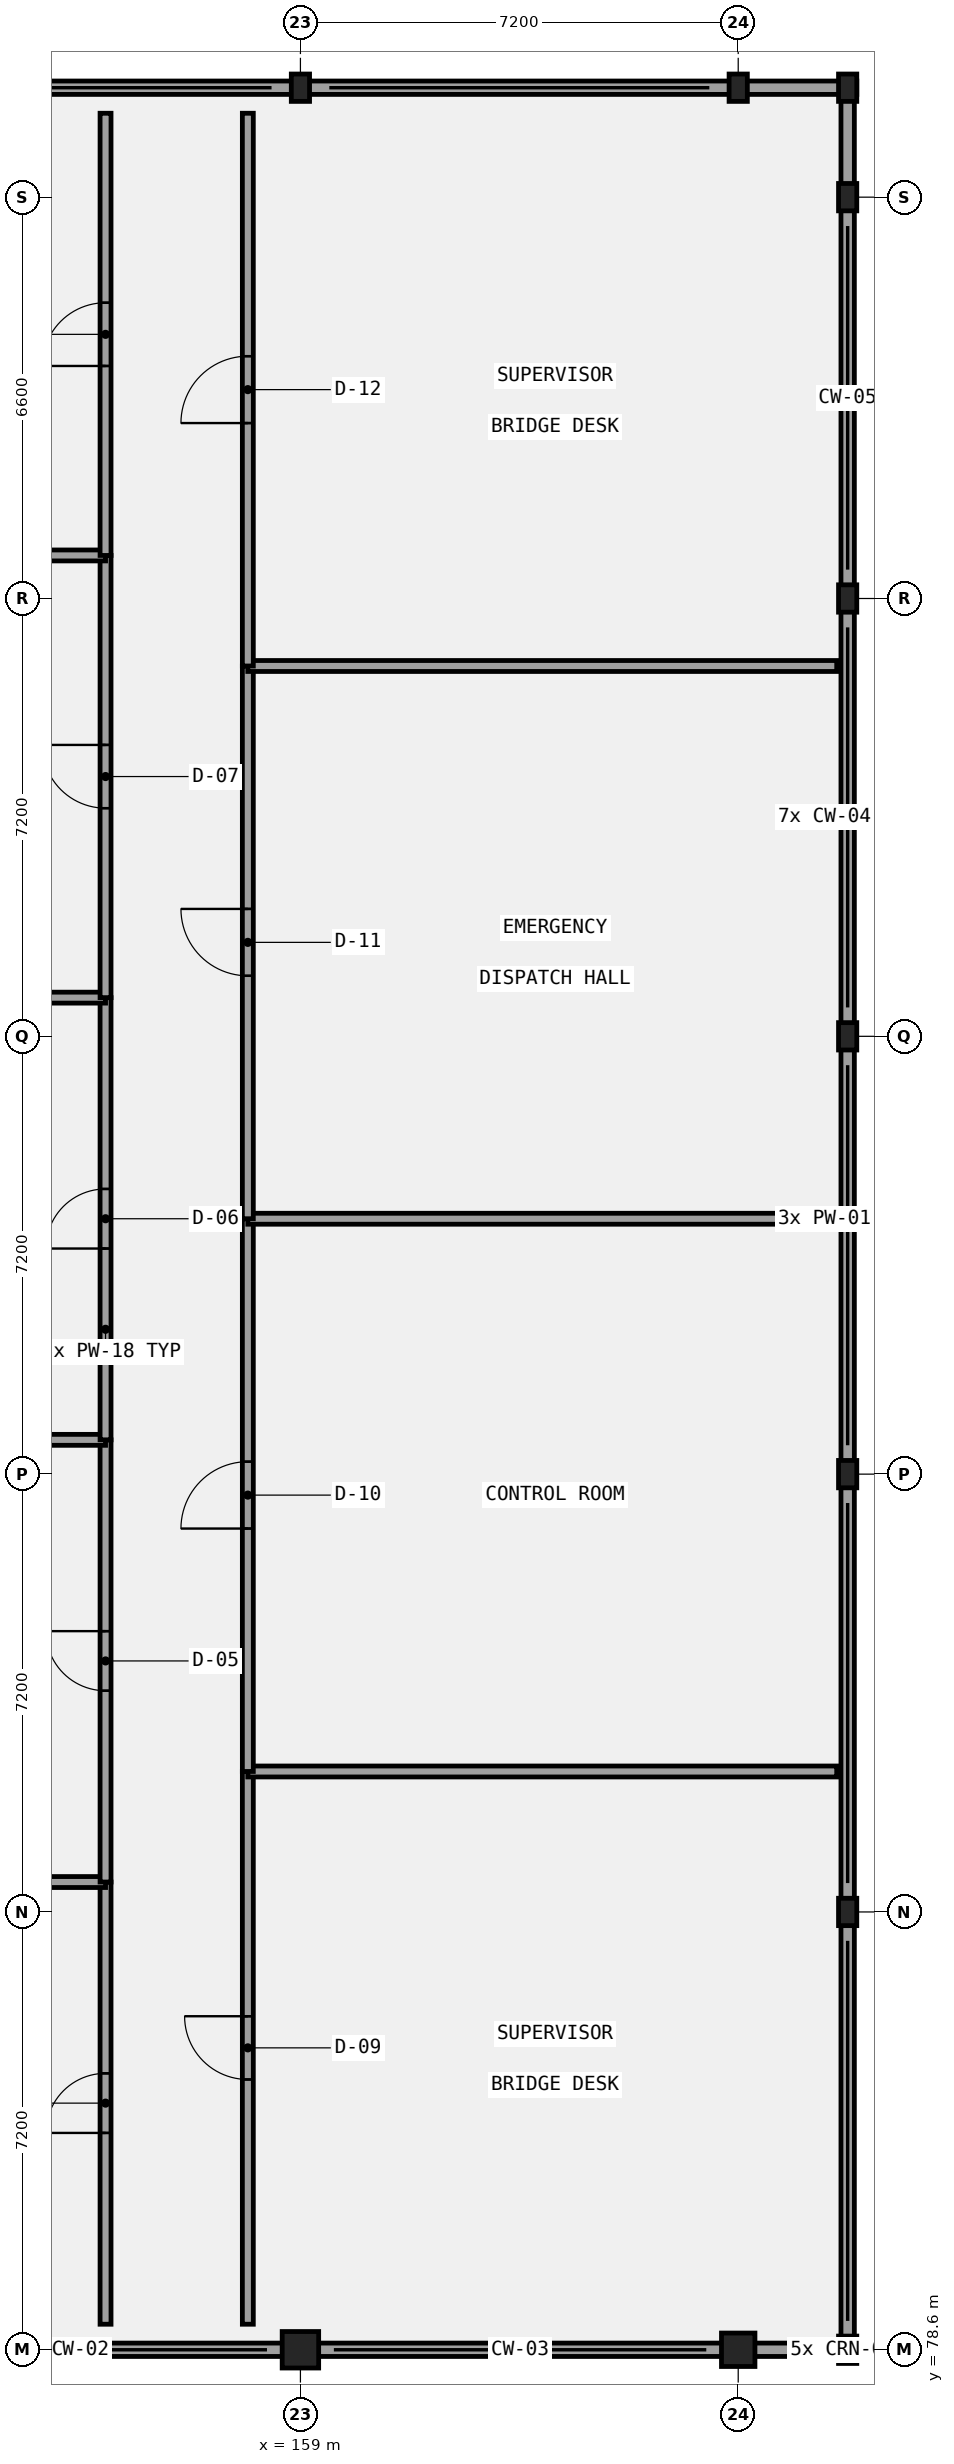
"""IFC4 building model, lengths in metres.
Left out: names, types, materials, properties, quantities, classifications, styles, units other than length and angle.
Written with IfcOpenShell. Run it as: python <this file> out.ifc"""

import sys

from ifc_helpers import new_model, si_unit, direction, frame, frame_2d, origin, origin_2d, place, context, subcontext, project, spatial, rectangle, i_section, extrude, element, fill, save


model = new_model("IFC4")
c1 = context("Model", 3, precision=1e-05, world=origin(), true_north=direction((0.0, 1.0)))
c2 = subcontext(c1, "Body", "Model", "MODEL_VIEW")
j1 = project(units=[si_unit("LENGTHUNIT", "METRE"), si_unit("PLANEANGLEUNIT", "RADIAN")], contexts=[c1])
p1 = place(None, origin())
s1 = spatial("IfcSite", under=j1, at=p1, CompositionType="ELEMENT")
p2 = place(p1, origin())
s2 = spatial("IfcBuilding", under=s1, at=p2, CompositionType="ELEMENT")
p3 = place(p2, frame((0.0, 0.0, 26.4)))
s3 = spatial("IfcBuildingStorey", under=s2, at=p3, CompositionType="ELEMENT", Elevation=26.4)
p4 = place(p3, frame((159.0, 78.6, 0.0), z_axis=(0.0, 0.0, 1.0), x_axis=(1.0, 0.0, 0.0)))
e1 = element("IfcColumn", 1, at=p4, inside=s3, PredefinedType="COLUMN", context=c2, shape_type="SweptSolid", body=[
    extrude(rectangle(XDim=0.6, YDim=0.6, at=origin_2d()), origin(), (0.0, 0.0, 1.0), 4.5),
])
p5 = place(p3, frame((166.2, 78.6, 0.0), z_axis=(0.0, 0.0, 1.0), x_axis=(1.0, 0.0, 0.0)))
e2 = element("IfcColumn", 2, at=p5, inside=s3, PredefinedType="COLUMN", context=c2, shape_type="SweptSolid", body=[
    extrude(rectangle(XDim=0.55, YDim=0.55, at=origin_2d()), origin(), (0.0, 0.0, 1.0), 4.5),
])
for number, where, z_axis, x_axis in (
    (3, (168.0, 78.6, 0.0), (0.0, 0.0, 1.0), (1.0, 0.0, 0.0)),
    (4, (168.0, 85.8, 0.0), (0.0, 0.0, 1.0), (1.0, 0.0, 0.0)),
    (5, (168.0, 93.0, 0.0), (0.0, 0.0, 1.0), (1.0, 0.0, 0.0)),
    (6, (168.0, 100.2, 0.0), (0.0, 0.0, 1.0), (1.0, 0.0, 0.0)),
    (7, (168.0, 107.4, 0.0), (0.0, 0.0, 1.0), (1.0, 0.0, 0.0)),
    (8, (168.0, 114.0, 0.0), (0.0, 0.0, 1.0), (1.0, 0.0, 0.0)),
    (9, (168.0, 115.8, 0.0), (0.0, 0.0, 1.0), (1.0, 0.0, 0.0)),
    (10, (166.2, 115.8, 0.0), (0.0, 0.0, 1.0), (1.0, 0.0, 0.0)),
    (11, (159.0, 115.8, 0.0), (0.0, 0.0, 1.0), (1.0, 0.0, 0.0)),
):
    element("IfcColumn", number, at=place(p3, frame(where, z_axis=z_axis, x_axis=x_axis)), inside=s3, PredefinedType="COLUMN", context=c2, shape_type="SweptSolid", body=[
        extrude(i_section(OverallWidth=0.3, OverallDepth=0.45, WebThickness=0.014, FlangeThickness=0.026, FilletRadius=0.027, at=origin_2d()), origin(), (0.0, 0.0, 1.0), 4.5),
    ])
p6 = place(p3, frame((144.45, 78.6, 0.0), z_axis=(0.0, 0.0, 1.0), x_axis=(1.0, 0.0, 0.0)))
e12 = element("IfcWall", 12, at=p6, inside=s3, PredefinedType="PARAPET", context=c2, shape_type="SweptSolid", body=[
    extrude(rectangle(XDim=23.7, YDim=0.22, at=frame_2d((11.85, 0.0))), origin(), (0.0, 0.0, 1.0), 0.45),
])
p7 = place(p3, frame((168.0, 78.75, 0.0), z_axis=(0.0, 0.0, 1.0), x_axis=(0.0, 1.0, 0.0)))
e13 = element("IfcWall", 13, at=p7, inside=s3, PredefinedType="PARAPET", context=c2, shape_type="SweptSolid", body=[
    extrude(rectangle(XDim=36.9, YDim=0.22, at=frame_2d((18.45, 0.0))), origin(), (0.0, 0.0, 1.0), 0.45),
])
p8 = place(p3, frame((168.15, 115.8, 0.0), z_axis=(0.0, 0.0, 1.0), x_axis=(-1.0, 0.0, 0.0)))
e14 = element("IfcWall", 14, at=p8, inside=s3, PredefinedType="PARAPET", context=c2, shape_type="SweptSolid", body=[
    extrude(rectangle(XDim=23.7, YDim=0.22, at=frame_2d((11.85, 0.0))), origin(), (0.0, 0.0, 1.0), 0.45),
])
p9 = place(p3, frame((155.795, 79.02, 0.0), z_axis=(0.0, 0.0, 1.0), x_axis=(0.0, 1.0, 0.0)))
e15 = element("IfcWall", 15, at=p9, inside=s3, PredefinedType="PARTITIONING", context=c2, shape_type="SweptSolid", body=[
    extrude(rectangle(XDim=7.272, YDim=0.18, at=frame_2d((3.636, 0.0))), origin(), (0.0, 0.0, 1.0), 4.22),
])
p10 = place(p9, frame((3.146, 0.0, 0.0)))
e16 = element("IfcOpeningElement", 16, at=p10, cuts=e15, PredefinedType="OPENING", context=c2, shape_type="SweptSolid", body=[
    extrude(rectangle(XDim=0.98, YDim=2.1, at=frame_2d((0.49, 1.05))), frame((0.0, 0.1, 0.0), z_axis=(0.0, -1.0, 0.0), x_axis=(1.0, 0.0, 0.0)), (0.0, 0.0, 1.0), 0.2),
])
p11 = place(p3, frame((145.25, 86.292, 0.0), z_axis=(0.0, 0.0, 1.0), x_axis=(1.0, 0.0, 0.0)))
e17 = element("IfcWall", 17, at=p11, inside=s3, PredefinedType="PARTITIONING", context=c2, shape_type="SweptSolid", body=[
    extrude(rectangle(XDim=10.545, YDim=0.18, at=frame_2d((5.272, 0.0))), origin(), (0.0, 0.0, 1.0), 4.22),
])
p12 = place(p3, frame((155.795, 86.292, 0.0), z_axis=(0.0, 0.0, 1.0), x_axis=(0.0, 1.0, 0.0)))
e18 = element("IfcWall", 18, at=p12, inside=s3, PredefinedType="PARTITIONING", context=c2, shape_type="SweptSolid", body=[
    extrude(rectangle(XDim=7.272, YDim=0.18, at=frame_2d((3.636, 0.0))), origin(), (0.0, 0.0, 1.0), 4.22),
])
p13 = place(p12, frame((3.146, 0.0, 0.0)))
e19 = element("IfcOpeningElement", 19, at=p13, cuts=e18, PredefinedType="OPENING", context=c2, shape_type="SweptSolid", body=[
    extrude(rectangle(XDim=0.98, YDim=2.22, at=frame_2d((0.49, 1.11))), frame((0.0, 0.1, 0.0), z_axis=(0.0, -1.0, 0.0), x_axis=(1.0, 0.0, 0.0)), (0.0, 0.0, 1.0), 0.2),
])
p14 = place(p3, frame((145.25, 93.564, 0.0), z_axis=(0.0, 0.0, 1.0), x_axis=(1.0, 0.0, 0.0)))
e20 = element("IfcWall", 20, at=p14, inside=s3, PredefinedType="PARTITIONING", context=c2, shape_type="SweptSolid", body=[
    extrude(rectangle(XDim=10.545, YDim=0.18, at=frame_2d((5.272, 0.0))), origin(), (0.0, 0.0, 1.0), 4.22),
])
p15 = place(p3, frame((155.795, 93.564, 0.0), z_axis=(0.0, 0.0, 1.0), x_axis=(0.0, 1.0, 0.0)))
e21 = element("IfcWall", 21, at=p15, inside=s3, PredefinedType="PARTITIONING", context=c2, shape_type="SweptSolid", body=[
    extrude(rectangle(XDim=7.272, YDim=0.18, at=frame_2d((3.636, 0.0))), origin(), (0.0, 0.0, 1.0), 4.22),
])
p16 = place(p15, frame((3.146, 0.0, 0.0)))
e22 = element("IfcOpeningElement", 22, at=p16, cuts=e21, PredefinedType="OPENING", context=c2, shape_type="SweptSolid", body=[
    extrude(rectangle(XDim=0.98, YDim=2.35, at=frame_2d((0.49, 1.175))), frame((0.0, 0.1, 0.0), z_axis=(0.0, -1.0, 0.0), x_axis=(1.0, 0.0, 0.0)), (0.0, 0.0, 1.0), 0.2),
])
p17 = place(p3, frame((145.25, 100.836, 0.0), z_axis=(0.0, 0.0, 1.0), x_axis=(1.0, 0.0, 0.0)))
e23 = element("IfcWall", 23, at=p17, inside=s3, PredefinedType="PARTITIONING", context=c2, shape_type="SweptSolid", body=[
    extrude(rectangle(XDim=10.545, YDim=0.18, at=frame_2d((5.272, 0.0))), origin(), (0.0, 0.0, 1.0), 4.22),
])
p18 = place(p3, frame((155.795, 100.836, 0.0), z_axis=(0.0, 0.0, 1.0), x_axis=(0.0, 1.0, 0.0)))
e24 = element("IfcWall", 24, at=p18, inside=s3, PredefinedType="PARTITIONING", context=c2, shape_type="SweptSolid", body=[
    extrude(rectangle(XDim=7.272, YDim=0.18, at=frame_2d((3.636, 0.0))), origin(), (0.0, 0.0, 1.0), 4.22),
])
p19 = place(p18, frame((3.116, 0.0, 0.0)))
e25 = element("IfcOpeningElement", 25, at=p19, cuts=e24, PredefinedType="OPENING", context=c2, shape_type="SweptSolid", body=[
    extrude(rectangle(XDim=1.04, YDim=2.1, at=frame_2d((0.52, 1.05))), frame((0.0, 0.1, 0.0), z_axis=(0.0, -1.0, 0.0), x_axis=(1.0, 0.0, 0.0)), (0.0, 0.0, 1.0), 0.2),
])
p20 = place(p3, frame((145.25, 108.108, 0.0), z_axis=(0.0, 0.0, 1.0), x_axis=(1.0, 0.0, 0.0)))
e26 = element("IfcWall", 26, at=p20, inside=s3, PredefinedType="PARTITIONING", context=c2, shape_type="SweptSolid", body=[
    extrude(rectangle(XDim=10.545, YDim=0.18, at=frame_2d((5.272, 0.0))), origin(), (0.0, 0.0, 1.0), 4.22),
])
p21 = place(p3, frame((155.795, 108.108, 0.0), z_axis=(0.0, 0.0, 1.0), x_axis=(0.0, 1.0, 0.0)))
e27 = element("IfcWall", 27, at=p21, inside=s3, PredefinedType="PARTITIONING", context=c2, shape_type="SweptSolid", body=[
    extrude(rectangle(XDim=7.272, YDim=0.18, at=frame_2d((3.636, 0.0))), origin(), (0.0, 0.0, 1.0), 4.22),
])
p22 = place(p21, frame((3.116, 0.0, 0.0)))
e28 = element("IfcOpeningElement", 28, at=p22, cuts=e27, PredefinedType="OPENING", context=c2, shape_type="SweptSolid", body=[
    extrude(rectangle(XDim=1.04, YDim=2.22, at=frame_2d((0.52, 1.11))), frame((0.0, 0.1, 0.0), z_axis=(0.0, -1.0, 0.0), x_axis=(1.0, 0.0, 0.0)), (0.0, 0.0, 1.0), 0.2),
])
p23 = place(p3, frame((158.135, 79.02, 0.0), z_axis=(0.0, 0.0, 1.0), x_axis=(0.0, 1.0, 0.0)))
e29 = element("IfcWall", 29, at=p23, inside=s3, PredefinedType="PARTITIONING", context=c2, shape_type="SweptSolid", body=[
    extrude(rectangle(XDim=9.09, YDim=0.18, at=frame_2d((4.545, 0.0))), origin(), (0.0, 0.0, 1.0), 4.22),
])
p24 = place(p23, frame((4.025, 0.0, 0.0)))
e30 = element("IfcOpeningElement", 30, at=p24, cuts=e29, PredefinedType="OPENING", context=c2, shape_type="SweptSolid", body=[
    extrude(rectangle(XDim=1.04, YDim=2.35, at=frame_2d((0.52, 1.175))), frame((0.0, 0.1, 0.0), z_axis=(0.0, -1.0, 0.0), x_axis=(1.0, 0.0, 0.0)), (0.0, 0.0, 1.0), 0.2),
])
p25 = place(p3, frame((158.135, 88.11, 0.0), z_axis=(0.0, 0.0, 1.0), x_axis=(1.0, 0.0, 0.0)))
e31 = element("IfcWall", 31, at=p25, inside=s3, PredefinedType="PARTITIONING", context=c2, shape_type="SweptSolid", body=[
    extrude(rectangle(XDim=9.685, YDim=0.18, at=frame_2d((4.843, 0.0))), origin(), (0.0, 0.0, 1.0), 4.22),
])
p26 = place(p3, frame((158.135, 88.11, 0.0), z_axis=(0.0, 0.0, 1.0), x_axis=(0.0, 1.0, 0.0)))
e32 = element("IfcWall", 32, at=p26, inside=s3, PredefinedType="PARTITIONING", context=c2, shape_type="SweptSolid", body=[
    extrude(rectangle(XDim=9.09, YDim=0.18, at=frame_2d((4.545, 0.0))), origin(), (0.0, 0.0, 1.0), 4.22),
])
p27 = place(p26, frame((3.995, 0.0, 0.0)))
e33 = element("IfcOpeningElement", 33, at=p27, cuts=e32, PredefinedType="OPENING", context=c2, shape_type="SweptSolid", body=[
    extrude(rectangle(XDim=1.1, YDim=2.1, at=frame_2d((0.55, 1.05))), frame((0.0, 0.1, 0.0), z_axis=(0.0, -1.0, 0.0), x_axis=(1.0, 0.0, 0.0)), (0.0, 0.0, 1.0), 0.2),
])
p28 = place(p3, frame((158.135, 97.2, 0.0), z_axis=(0.0, 0.0, 1.0), x_axis=(1.0, 0.0, 0.0)))
e34 = element("IfcWall", 34, at=p28, inside=s3, PredefinedType="PARTITIONING", context=c2, shape_type="SweptSolid", body=[
    extrude(rectangle(XDim=9.685, YDim=0.18, at=frame_2d((4.843, 0.0))), origin(), (0.0, 0.0, 1.0), 4.22),
])
p29 = place(p3, frame((158.135, 97.2, 0.0), z_axis=(0.0, 0.0, 1.0), x_axis=(0.0, 1.0, 0.0)))
e35 = element("IfcWall", 35, at=p29, inside=s3, PredefinedType="PARTITIONING", context=c2, shape_type="SweptSolid", body=[
    extrude(rectangle(XDim=9.09, YDim=0.18, at=frame_2d((4.545, 0.0))), origin(), (0.0, 0.0, 1.0), 4.22),
])
p30 = place(p29, frame((3.995, 0.0, 0.0)))
e36 = element("IfcOpeningElement", 36, at=p30, cuts=e35, PredefinedType="OPENING", context=c2, shape_type="SweptSolid", body=[
    extrude(rectangle(XDim=1.1, YDim=2.22, at=frame_2d((0.55, 1.11))), frame((0.0, 0.1, 0.0), z_axis=(0.0, -1.0, 0.0), x_axis=(1.0, 0.0, 0.0)), (0.0, 0.0, 1.0), 0.2),
])
p31 = place(p3, frame((158.135, 106.29, 0.0), z_axis=(0.0, 0.0, 1.0), x_axis=(1.0, 0.0, 0.0)))
e37 = element("IfcWall", 37, at=p31, inside=s3, PredefinedType="PARTITIONING", context=c2, shape_type="SweptSolid", body=[
    extrude(rectangle(XDim=9.685, YDim=0.18, at=frame_2d((4.843, 0.0))), origin(), (0.0, 0.0, 1.0), 4.22),
])
p32 = place(p3, frame((158.135, 106.29, 0.0), z_axis=(0.0, 0.0, 1.0), x_axis=(0.0, 1.0, 0.0)))
e38 = element("IfcWall", 38, at=p32, inside=s3, PredefinedType="PARTITIONING", context=c2, shape_type="SweptSolid", body=[
    extrude(rectangle(XDim=9.09, YDim=0.18, at=frame_2d((4.545, 0.0))), origin(), (0.0, 0.0, 1.0), 4.22),
])
p33 = place(p32, frame((3.995, 0.0, 0.0)))
e39 = element("IfcOpeningElement", 39, at=p33, cuts=e38, PredefinedType="OPENING", context=c2, shape_type="SweptSolid", body=[
    extrude(rectangle(XDim=1.1, YDim=2.35, at=frame_2d((0.55, 1.175))), frame((0.0, 0.1, 0.0), z_axis=(0.0, -1.0, 0.0), x_axis=(1.0, 0.0, 0.0)), (0.0, 0.0, 1.0), 0.2),
])
p34 = place(p10, frame((0.98, 0.0, 0.0), z_axis=(0.0, 0.0, 1.0), x_axis=(-1.0, 0.0, 0.0)))
e40 = element("IfcDoor", 40, at=p34, inside=s3, OperationType="SINGLE_SWING_LEFT", PredefinedType="DOOR", context=c2, shape_type="SweptSolid", body=[
    extrude(rectangle(XDim=0.98, YDim=2.1, at=frame_2d((0.49, 1.05))), frame((0.0, 0.025, 0.0), z_axis=(0.0, -1.0, 0.0), x_axis=(1.0, 0.0, 0.0)), (0.0, 0.0, 1.0), 0.05),
])
fill(e16, e40)
p35 = place(p13, frame((0.98, 0.0, 0.0), z_axis=(0.0, 0.0, 1.0), x_axis=(-1.0, 0.0, 0.0)))
e41 = element("IfcDoor", 41, at=p35, inside=s3, OperationType="SINGLE_SWING_RIGHT", PredefinedType="DOOR", context=c2, shape_type="SweptSolid", body=[
    extrude(rectangle(XDim=0.98, YDim=2.22, at=frame_2d((0.49, 1.11))), frame((0.0, 0.025, 0.0), z_axis=(0.0, -1.0, 0.0), x_axis=(1.0, 0.0, 0.0)), (0.0, 0.0, 1.0), 0.05),
])
fill(e19, e41)
p36 = place(p16, frame((0.98, 0.0, 0.0), z_axis=(0.0, 0.0, 1.0), x_axis=(-1.0, 0.0, 0.0)))
e42 = element("IfcDoor", 42, at=p36, inside=s3, OperationType="SINGLE_SWING_LEFT", PredefinedType="DOOR", context=c2, shape_type="SweptSolid", body=[
    extrude(rectangle(XDim=0.98, YDim=2.35, at=frame_2d((0.49, 1.175))), frame((0.0, 0.025, 0.0), z_axis=(0.0, -1.0, 0.0), x_axis=(1.0, 0.0, 0.0)), (0.0, 0.0, 1.0), 0.05),
])
fill(e22, e42)
p37 = place(p19, frame((1.04, 0.0, 0.0), z_axis=(0.0, 0.0, 1.0), x_axis=(-1.0, 0.0, 0.0)))
e43 = element("IfcDoor", 43, at=p37, inside=s3, OperationType="SINGLE_SWING_RIGHT", PredefinedType="DOOR", context=c2, shape_type="SweptSolid", body=[
    extrude(rectangle(XDim=1.04, YDim=2.1, at=frame_2d((0.52, 1.05))), frame((0.0, 0.025, 0.0), z_axis=(0.0, -1.0, 0.0), x_axis=(1.0, 0.0, 0.0)), (0.0, 0.0, 1.0), 0.05),
])
fill(e25, e43)
p38 = place(p22, frame((1.04, 0.0, 0.0), z_axis=(0.0, 0.0, 1.0), x_axis=(-1.0, 0.0, 0.0)))
e44 = element("IfcDoor", 44, at=p38, inside=s3, OperationType="SINGLE_SWING_LEFT", PredefinedType="DOOR", context=c2, shape_type="SweptSolid", body=[
    extrude(rectangle(XDim=1.04, YDim=2.22, at=frame_2d((0.52, 1.11))), frame((0.0, 0.025, 0.0), z_axis=(0.0, -1.0, 0.0), x_axis=(1.0, 0.0, 0.0)), (0.0, 0.0, 1.0), 0.05),
])
fill(e28, e44)
p39 = place(p24, origin())
e45 = element("IfcDoor", 45, at=p39, inside=s3, OperationType="SINGLE_SWING_RIGHT", PredefinedType="DOOR", context=c2, shape_type="SweptSolid", body=[
    extrude(rectangle(XDim=1.04, YDim=2.35, at=frame_2d((0.52, 1.175))), frame((0.0, 0.025, 0.0), z_axis=(0.0, -1.0, 0.0), x_axis=(1.0, 0.0, 0.0)), (0.0, 0.0, 1.0), 0.05),
])
fill(e30, e45)
p40 = place(p27, origin())
e46 = element("IfcDoor", 46, at=p40, inside=s3, OperationType="SINGLE_SWING_LEFT", PredefinedType="DOOR", context=c2, shape_type="SweptSolid", body=[
    extrude(rectangle(XDim=1.1, YDim=2.1, at=frame_2d((0.55, 1.05))), frame((0.0, 0.025, 0.0), z_axis=(0.0, -1.0, 0.0), x_axis=(1.0, 0.0, 0.0)), (0.0, 0.0, 1.0), 0.05),
])
fill(e33, e46)
p41 = place(p30, origin())
e47 = element("IfcDoor", 47, at=p41, inside=s3, OperationType="SINGLE_SWING_RIGHT", PredefinedType="DOOR", context=c2, shape_type="SweptSolid", body=[
    extrude(rectangle(XDim=1.1, YDim=2.22, at=frame_2d((0.55, 1.11))), frame((0.0, 0.025, 0.0), z_axis=(0.0, -1.0, 0.0), x_axis=(1.0, 0.0, 0.0)), (0.0, 0.0, 1.0), 0.05),
])
fill(e36, e47)
p42 = place(p33, origin())
e48 = element("IfcDoor", 48, at=p42, inside=s3, OperationType="SINGLE_SWING_LEFT", PredefinedType="DOOR", context=c2, shape_type="SweptSolid", body=[
    extrude(rectangle(XDim=1.1, YDim=2.35, at=frame_2d((0.55, 1.175))), frame((0.0, 0.025, 0.0), z_axis=(0.0, -1.0, 0.0), x_axis=(1.0, 0.0, 0.0)), (0.0, 0.0, 1.0), 0.05),
])
fill(e39, e48)
save(model, sys.argv[1])
